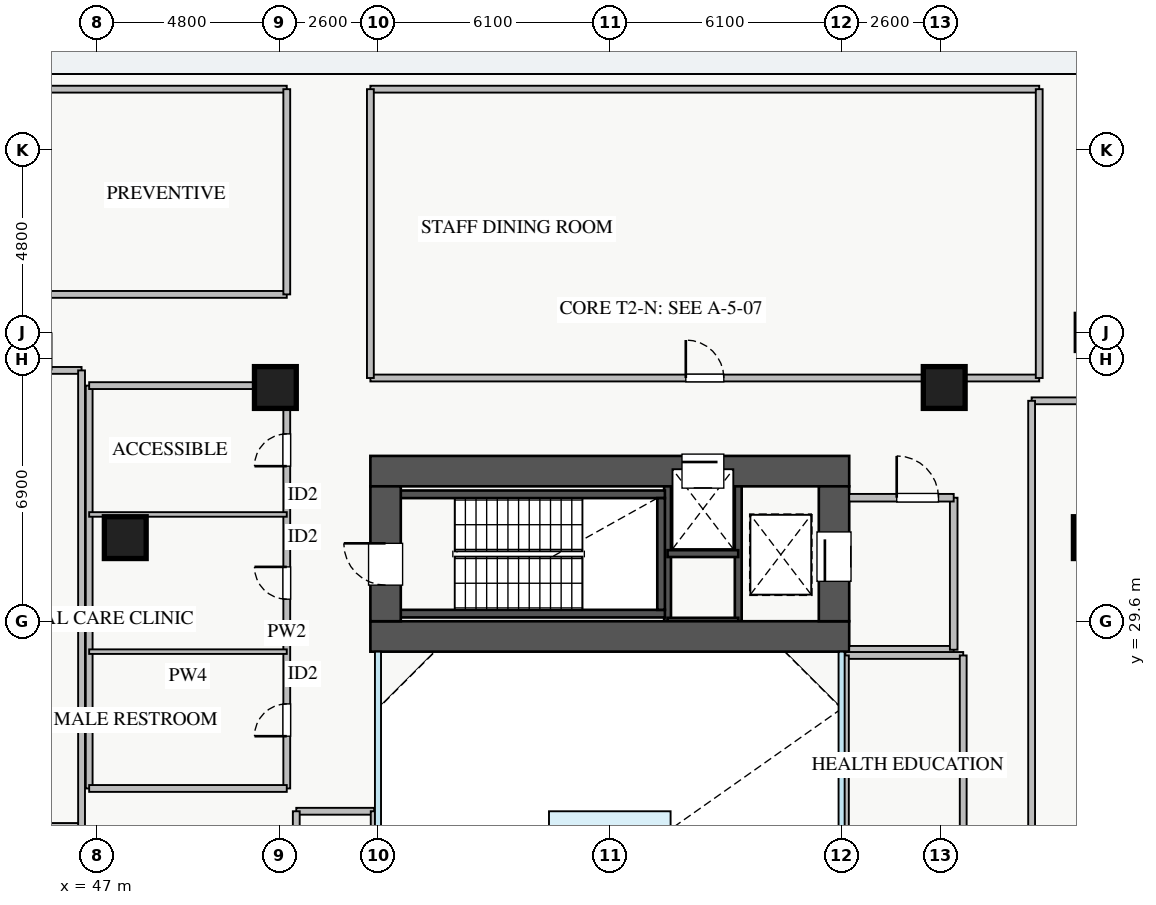
"""IFC4 building model, lengths in metres.
Left out: names, types, materials, properties, quantities, classifications, styles, units other than length and angle.
Written with IfcOpenShell. Run it as: python <this file> out.ifc"""

import sys

from ifc_helpers import new_model, si_unit, direction, frame, frame_2d, origin, origin_2d, place, context, subcontext, project, spatial, rectangle, extrude, source, transform, mapped, element, fill, save


model = new_model("IFC4")
c1 = context("Model", 3, precision=1e-05, world=origin(), true_north=direction((0.0, 1.0)))
c2 = subcontext(c1, "Body", "Model", "MODEL_VIEW")
j1 = project(units=[si_unit("LENGTHUNIT", "METRE"), si_unit("PLANEANGLEUNIT", "RADIAN")], contexts=[c1])
p1 = place(None, origin())
s1 = spatial("IfcSite", under=j1, at=p1, CompositionType="ELEMENT")
p2 = place(p1, origin())
s2 = spatial("IfcBuilding", under=s1, at=p2, CompositionType="ELEMENT")
p3 = place(p2, frame((0.0, 0.0, 5.0)))
s3 = spatial("IfcBuildingStorey", under=s2, at=p3, CompositionType="ELEMENT", Elevation=5.0)
for number, where, z_axis, x_axis in (
    (1, (62.02, 29.6, 0.0), (0.0, 0.0, 1.0), (0.0, 1.0, 0.0)),
    (2, (63.88, 29.6, 0.0), (0.0, 0.0, 1.0), (0.0, 1.0, 0.0)),
):
    element("IfcWall", number, at=place(p3, frame(where, z_axis=z_axis, x_axis=x_axis)), inside=s3, PredefinedType="SHEAR", context=c2, shape_type="SweptSolid", body=[
        extrude(rectangle(XDim=3.95, YDim=0.18, at=frame_2d((1.975, 0.0))), origin(), (0.0, 0.0, 1.0), 4.18),
    ])
for number, where, z_axis, x_axis in (
    (3, (62.02, 31.38, 0.0), (0.0, 0.0, 1.0), (1.0, 0.0, 0.0)),
    (4, (62.02, 29.6, 0.0), (0.0, 0.0, 1.0), (1.0, 0.0, 0.0)),
):
    element("IfcWall", number, at=place(p3, frame(where, z_axis=z_axis, x_axis=x_axis)), inside=s3, PredefinedType="SHEAR", context=c2, shape_type="SweptSolid", body=[
        extrude(rectangle(XDim=1.86, YDim=0.18, at=frame_2d((0.93, 0.0))), origin(), (0.0, 0.0, 1.0), 4.18),
    ])
for number, where, z_axis, x_axis in (
    (5, (54.8, 29.8, 0.0), (0.0, 0.0, 1.0), (1.0, 0.0, 0.0)),
    (6, (54.8, 32.94, 0.0), (0.0, 0.0, 1.0), (1.0, 0.0, 0.0)),
):
    element("IfcWall", number, at=place(p3, frame(where, z_axis=z_axis, x_axis=x_axis)), inside=s3, PredefinedType="SHEAR", context=c2, shape_type="SweptSolid", body=[
        extrude(rectangle(XDim=7.15, YDim=0.2, at=frame_2d((3.575, 0.0))), origin(), (0.0, 0.0, 1.0), 4.4),
    ])
p4 = place(p3, frame((61.85, 29.9, 0.0), z_axis=(0.0, 0.0, 1.0), x_axis=(0.0, 1.0, 0.0)))
e7 = element("IfcWall", 7, at=p4, inside=s3, PredefinedType="SHEAR", context=c2, shape_type="SweptSolid", body=[
    extrude(rectangle(XDim=2.94, YDim=0.2, at=frame_2d((1.47, 0.0))), origin(), (0.0, 0.0, 1.0), 4.4),
])
p5 = place(p3, frame((54.2, 29.2, 0.0), z_axis=(0.0, 0.0, 1.0), x_axis=(1.0, 0.0, 0.0)))
e8 = element("IfcWall", 8, at=p5, inside=s3, PredefinedType="SHEAR", context=c2, shape_type="SweptSolid", body=[
    extrude(rectangle(XDim=12.6, YDim=0.8, at=frame_2d((6.3, 0.0))), origin(), (0.0, 0.0, 1.0), 4.4),
])
p6 = place(p3, frame((54.2, 33.55, 0.0), z_axis=(0.0, 0.0, 1.0), x_axis=(1.0, 0.0, 0.0)))
e9 = element("IfcWall", 9, at=p6, inside=s3, PredefinedType="SHEAR", context=c2, shape_type="SweptSolid", body=[
    extrude(rectangle(XDim=12.6, YDim=0.8, at=frame_2d((6.3, 0.0))), origin(), (0.0, 0.0, 1.0), 4.4),
])
p7 = place(p6, frame((8.2, 0.0, 0.0)))
e10 = element("IfcOpeningElement", 10, at=p7, cuts=e9, PredefinedType="OPENING", context=c2, shape_type="SweptSolid", body=[
    extrude(rectangle(XDim=1.1, YDim=2.05, at=frame_2d((0.55, 1.025))), frame((0.0, 0.41, 0.0), z_axis=(0.0, -1.0, 0.0), x_axis=(1.0, 0.0, 0.0)), (0.0, 0.0, 1.0), 0.82),
])
p8 = place(p3, frame((54.6, 29.6, 0.0), z_axis=(0.0, 0.0, 1.0), x_axis=(0.0, 1.0, 0.0)))
e11 = element("IfcWall", 11, at=p8, inside=s3, PredefinedType="SHEAR", context=c2, shape_type="SweptSolid", body=[
    extrude(rectangle(XDim=3.55, YDim=0.8, at=frame_2d((1.775, 0.0))), origin(), (0.0, 0.0, 1.0), 4.4),
])
p9 = place(p8, frame((0.95, 0.0, 0.0)))
e12 = element("IfcOpeningElement", 12, at=p9, cuts=e11, PredefinedType="OPENING", context=c2, shape_type="SweptSolid", body=[
    extrude(rectangle(XDim=1.1, YDim=2.05, at=frame_2d((0.55, 1.025))), frame((0.0, 0.41, 0.0), z_axis=(0.0, -1.0, 0.0), x_axis=(1.0, 0.0, 0.0)), (0.0, 0.0, 1.0), 0.82),
])
p10 = place(p3, frame((66.4, 29.6, 0.0), z_axis=(0.0, 0.0, 1.0), x_axis=(0.0, 1.0, 0.0)))
e13 = element("IfcWall", 13, at=p10, inside=s3, PredefinedType="SHEAR", context=c2, shape_type="SweptSolid", body=[
    extrude(rectangle(XDim=3.55, YDim=0.8, at=frame_2d((1.775, 0.0))), origin(), (0.0, 0.0, 1.0), 4.4),
])
p11 = place(p10, frame((1.05, 0.0, 0.0)))
e14 = element("IfcOpeningElement", 14, at=p11, cuts=e13, PredefinedType="OPENING", context=c2, shape_type="SweptSolid", body=[
    extrude(rectangle(XDim=1.3, YDim=2.05, at=frame_2d((0.65, 1.025))), frame((0.0, 0.41, 0.0), z_axis=(0.0, -1.0, 0.0), x_axis=(1.0, 0.0, 0.0)), (0.0, 0.0, 1.0), 0.82),
])
m1 = source(origin(), c2, "Body", "SweptSolid", [
    extrude(rectangle(XDim=1.1, YDim=1.1, at=origin_2d()), origin(), (0.0, 0.0, 1.0), 4.4),
])
for number, where, z_axis, x_axis in (
    (15, (73.25, 31.8, 0.0), (0.0, 0.0, 1.0), (1.0, 0.0, 0.0)),
    (16, (69.3, 35.75, 0.0), (0.0, 0.0, 1.0), (1.0, 0.0, 0.0)),
    (17, (51.7, 35.75, 0.0), (0.0, 0.0, 1.0), (1.0, 0.0, 0.0)),
    (18, (47.75, 31.8, 0.0), (0.0, 0.0, 1.0), (1.0, 0.0, 0.0)),
):
    element("IfcColumn", number, at=place(p3, frame(where, z_axis=z_axis, x_axis=x_axis)), inside=s3, PredefinedType="COLUMN", context=c2, shape_type="MappedRepresentation", body=[
        mapped(m1, transform((0.0, 0.0, 0.0), x_axis=(1.0, 0.0, 0.0), y_axis=(0.0, 1.0, 0.0), z_axis=(0.0, 0.0, 1.0), scale=1.0)),
    ])
p12 = place(p3, frame((66.8, 28.85, 0.0), z_axis=(0.0, 0.0, 1.0), x_axis=(1.0, 0.0, 0.0)))
e19 = element("IfcWall", 19, at=p12, inside=s3, PredefinedType="PARTITIONING", context=c2, shape_type="SweptSolid", body=[
    extrude(rectangle(XDim=2.75, YDim=0.2, at=frame_2d((1.375, 0.0))), origin(), (0.0, 0.0, 1.0), 4.18),
])
p13 = place(p3, frame((69.55, 28.85, 0.0), z_axis=(0.0, 0.0, 1.0), x_axis=(0.0, 1.0, 0.0)))
e20 = element("IfcWall", 20, at=p13, inside=s3, PredefinedType="PARTITIONING", context=c2, shape_type="SweptSolid", body=[
    extrude(rectangle(XDim=4.0, YDim=0.2, at=frame_2d((2.0, 0.0))), origin(), (0.0, 0.0, 1.0), 4.18),
])
p14 = place(p3, frame((66.8, 32.85, 0.0), z_axis=(0.0, 0.0, 1.0), x_axis=(1.0, 0.0, 0.0)))
e21 = element("IfcWall", 21, at=p14, inside=s3, PredefinedType="PARTITIONING", context=c2, shape_type="SweptSolid", body=[
    extrude(rectangle(XDim=2.75, YDim=0.2, at=frame_2d((1.375, 0.0))), origin(), (0.0, 0.0, 1.0), 4.18),
])
p15 = place(p14, frame((1.25, 0.0, 0.0)))
e22 = element("IfcOpeningElement", 22, at=p15, cuts=e21, PredefinedType="OPENING", context=c2, shape_type="SweptSolid", body=[
    extrude(rectangle(XDim=1.1, YDim=2.05, at=frame_2d((0.55, 1.025))), frame((0.0, 0.11, 0.0), z_axis=(0.0, -1.0, 0.0), x_axis=(1.0, 0.0, 0.0)), (0.0, 0.0, 1.0), 0.22),
])
p16 = place(p3, frame((52.0, 25.2, 0.0), z_axis=(0.0, 0.0, 1.0), x_axis=(0.0, 1.0, 0.0)))
e23 = element("IfcWall", 23, at=p16, inside=s3, PredefinedType="PARTITIONING", context=c2, shape_type="SweptSolid", body=[
    extrude(rectangle(XDim=10.6, YDim=0.18, at=frame_2d((5.3, 0.0))), origin(), (0.0, 0.0, 1.0), 4.18),
])
p17 = place(p16, frame((1.375, 0.0, 0.0)))
e24 = element("IfcOpeningElement", 24, at=p17, cuts=e23, PredefinedType="OPENING", context=c2, shape_type="SweptSolid", body=[
    extrude(rectangle(XDim=0.85, YDim=2.05, at=frame_2d((0.425, 1.025))), frame((0.0, 0.1, 0.0), z_axis=(0.0, -1.0, 0.0), x_axis=(1.0, 0.0, 0.0)), (0.0, 0.0, 1.0), 0.2),
])
p18 = place(p16, frame((4.98, 0.0, 0.0)))
e25 = element("IfcOpeningElement", 25, at=p18, cuts=e23, PredefinedType="OPENING", context=c2, shape_type="SweptSolid", body=[
    extrude(rectangle(XDim=0.85, YDim=2.05, at=frame_2d((0.425, 1.025))), frame((0.0, 0.1, 0.0), z_axis=(0.0, -1.0, 0.0), x_axis=(1.0, 0.0, 0.0)), (0.0, 0.0, 1.0), 0.2),
])
p19 = place(p16, frame((8.48, 0.0, 0.0)))
e26 = element("IfcOpeningElement", 26, at=p19, cuts=e23, PredefinedType="OPENING", context=c2, shape_type="SweptSolid", body=[
    extrude(rectangle(XDim=0.85, YDim=2.05, at=frame_2d((0.425, 1.025))), frame((0.0, 0.1, 0.0), z_axis=(0.0, -1.0, 0.0), x_axis=(1.0, 0.0, 0.0)), (0.0, 0.0, 1.0), 0.2),
])
p20 = place(p3, frame((46.8, 25.2, 0.0), z_axis=(0.0, 0.0, 1.0), x_axis=(0.0, 1.0, 0.0)))
e27 = element("IfcWall", 27, at=p20, inside=s3, PredefinedType="PARTITIONING", context=c2, shape_type="SweptSolid", body=[
    extrude(rectangle(XDim=10.6, YDim=0.18, at=frame_2d((5.3, 0.0))), origin(), (0.0, 0.0, 1.0), 4.18),
])
for number, where, z_axis, x_axis in (
    (28, (46.8, 25.2, 0.0), (0.0, 0.0, 1.0), (1.0, 0.0, 0.0)),
    (29, (46.8, 35.8, 0.0), (0.0, 0.0, 1.0), (1.0, 0.0, 0.0)),
):
    element("IfcWall", number, at=place(p3, frame(where, z_axis=z_axis, x_axis=x_axis)), inside=s3, PredefinedType="PARTITIONING", context=c2, shape_type="SweptSolid", body=[
        extrude(rectangle(XDim=5.2, YDim=0.18, at=frame_2d((2.6, 0.0))), origin(), (0.0, 0.0, 1.0), 4.18),
    ])
for number, where, z_axis, x_axis in (
    (30, (46.8, 28.8, 0.0), (0.0, 0.0, 1.0), (1.0, 0.0, 0.0)),
    (31, (46.8, 32.41, 0.0), (0.0, 0.0, 1.0), (1.0, 0.0, 0.0)),
):
    element("IfcWall", number, at=place(p3, frame(where, z_axis=z_axis, x_axis=x_axis)), inside=s3, PredefinedType="PLUMBINGWALL", context=c2, shape_type="SweptSolid", body=[
        extrude(rectangle(XDim=5.2, YDim=0.12, at=frame_2d((2.6, 0.0))), origin(), (0.0, 0.0, 1.0), 4.18),
    ])
p21 = place(p3, frame((44.0, 24.2, 0.0), z_axis=(0.0, 0.0, 1.0), x_axis=(1.0, 0.0, 0.0)))
e32 = element("IfcWall", 32, at=p21, inside=s3, PredefinedType="PARTITIONING", context=c2, shape_type="SweptSolid", body=[
    extrude(rectangle(XDim=2.6, YDim=0.18, at=frame_2d((1.3, 0.0))), origin(), (0.0, 0.0, 1.0), 4.18),
])
p22 = place(p3, frame((44.0, 36.2, 0.0), z_axis=(0.0, 0.0, 1.0), x_axis=(1.0, 0.0, 0.0)))
e33 = element("IfcWall", 33, at=p22, inside=s3, PredefinedType="PARTITIONING", context=c2, shape_type="SweptSolid", body=[
    extrude(rectangle(XDim=2.6, YDim=0.18, at=frame_2d((1.3, 0.0))), origin(), (0.0, 0.0, 1.0), 4.18),
])
p23 = place(p22, frame((0.8, 0.0, 0.0)))
e34 = element("IfcOpeningElement", 34, at=p23, cuts=e33, PredefinedType="OPENING", context=c2, shape_type="SweptSolid", body=[
    extrude(rectangle(XDim=1.0, YDim=2.05, at=frame_2d((0.5, 1.025))), frame((0.0, 0.1, 0.0), z_axis=(0.0, -1.0, 0.0), x_axis=(1.0, 0.0, 0.0)), (0.0, 0.0, 1.0), 0.2),
])
p24 = place(p3, frame((46.6, 24.2, 0.0), z_axis=(0.0, 0.0, 1.0), x_axis=(0.0, 1.0, 0.0)))
e35 = element("IfcWall", 35, at=p24, inside=s3, PredefinedType="PARTITIONING", context=c2, shape_type="SweptSolid", body=[
    extrude(rectangle(XDim=12.0, YDim=0.18, at=frame_2d((6.0, 0.0))), origin(), (0.0, 0.0, 1.0), 4.18),
])
p25 = place(p3, frame((52.25, 24.6, 0.0), z_axis=(0.0, 0.0, 1.0), x_axis=(1.0, 0.0, 0.0)))
e36 = element("IfcWall", 36, at=p25, inside=s3, PredefinedType="PARTITIONING", context=c2, shape_type="SweptSolid", body=[
    extrude(rectangle(XDim=2.05, YDim=0.18, at=frame_2d((1.025, 0.0))), origin(), (0.0, 0.0, 1.0), 4.18),
])
p26 = place(p3, frame((52.25, 17.4, 0.0), z_axis=(0.0, 0.0, 1.0), x_axis=(0.0, 1.0, 0.0)))
e37 = element("IfcWall", 37, at=p26, inside=s3, PredefinedType="PARTITIONING", context=c2, shape_type="SweptSolid", body=[
    extrude(rectangle(XDim=7.2, YDim=0.18, at=frame_2d((3.6, 0.0))), origin(), (0.0, 0.0, 1.0), 4.18),
])
p27 = place(p26, frame((3.1, 0.0, 0.0)))
e38 = element("IfcOpeningElement", 38, at=p27, cuts=e37, PredefinedType="OPENING", context=c2, shape_type="SweptSolid", body=[
    extrude(rectangle(XDim=1.0, YDim=2.05, at=frame_2d((0.5, 1.025))), frame((0.0, 0.1, 0.0), z_axis=(0.0, -1.0, 0.0), x_axis=(1.0, 0.0, 0.0)), (0.0, 0.0, 1.0), 0.2),
])
p28 = place(p3, frame((54.3, 17.4, 0.0), z_axis=(0.0, 0.0, 1.0), x_axis=(0.0, 1.0, 0.0)))
e39 = element("IfcWall", 39, at=p28, inside=s3, PredefinedType="PARTITIONING", context=c2, shape_type="SweptSolid", body=[
    extrude(rectangle(XDim=7.2, YDim=0.18, at=frame_2d((3.6, 0.0))), origin(), (0.0, 0.0, 1.0), 4.18),
])
p29 = place(p3, frame((66.7, 28.7, 0.0), z_axis=(0.0, 0.0, 1.0), x_axis=(1.0, 0.0, 0.0)))
e40 = element("IfcWall", 40, at=p29, inside=s3, PredefinedType="PARTITIONING", context=c2, shape_type="SweptSolid", body=[
    extrude(rectangle(XDim=3.1, YDim=0.18, at=frame_2d((1.55, 0.0))), origin(), (0.0, 0.0, 1.0), 4.18),
])
p30 = place(p3, frame((66.7, 17.3, 0.0), z_axis=(0.0, 0.0, 1.0), x_axis=(0.0, 1.0, 0.0)))
e41 = element("IfcWall", 41, at=p30, inside=s3, PredefinedType="PARTITIONING", context=c2, shape_type="SweptSolid", body=[
    extrude(rectangle(XDim=11.4, YDim=0.18, at=frame_2d((5.7, 0.0))), origin(), (0.0, 0.0, 1.0), 4.18),
])
p31 = place(p3, frame((69.8, 17.3, 0.0), z_axis=(0.0, 0.0, 1.0), x_axis=(0.0, 1.0, 0.0)))
e42 = element("IfcWall", 42, at=p31, inside=s3, PredefinedType="PARTITIONING", context=c2, shape_type="SweptSolid", body=[
    extrude(rectangle(XDim=11.4, YDim=0.18, at=frame_2d((5.7, 0.0))), origin(), (0.0, 0.0, 1.0), 4.18),
])
p32 = place(p31, frame((5.2, 0.0, 0.0)))
e43 = element("IfcOpeningElement", 43, at=p32, cuts=e42, PredefinedType="OPENING", context=c2, shape_type="SweptSolid", body=[
    extrude(rectangle(XDim=1.0, YDim=2.05, at=frame_2d((0.5, 1.025))), frame((0.0, 0.1, 0.0), z_axis=(0.0, -1.0, 0.0), x_axis=(1.0, 0.0, 0.0)), (0.0, 0.0, 1.0), 0.2),
])
p33 = place(p3, frame((71.6, 35.4, 0.0), z_axis=(0.0, 0.0, 1.0), x_axis=(1.0, 0.0, 0.0)))
e44 = element("IfcWall", 44, at=p33, inside=s3, PredefinedType="PARTITIONING", context=c2, shape_type="SweptSolid", body=[
    extrude(rectangle(XDim=2.15, YDim=0.18, at=frame_2d((1.075, 0.0))), origin(), (0.0, 0.0, 1.0), 4.18),
])
p34 = place(p3, frame((71.6, 10.6, 0.0), z_axis=(0.0, 0.0, 1.0), x_axis=(0.0, 1.0, 0.0)))
e45 = element("IfcWall", 45, at=p34, inside=s3, PredefinedType="PARTITIONING", context=c2, shape_type="SweptSolid", body=[
    extrude(rectangle(XDim=24.8, YDim=0.18, at=frame_2d((12.4, 0.0))), origin(), (0.0, 0.0, 1.0), 4.18),
])
p35 = place(p34, frame((11.9, 0.0, 0.0)))
e46 = element("IfcOpeningElement", 46, at=p35, cuts=e45, PredefinedType="OPENING", context=c2, shape_type="SweptSolid", body=[
    extrude(rectangle(XDim=1.0, YDim=2.05, at=frame_2d((0.5, 1.025))), frame((0.0, 0.1, 0.0), z_axis=(0.0, -1.0, 0.0), x_axis=(1.0, 0.0, 0.0)), (0.0, 0.0, 1.0), 0.2),
])
p36 = place(p3, frame((32.3, 38.2, 0.0), z_axis=(0.0, 0.0, 1.0), x_axis=(1.0, 0.0, 0.0)))
e47 = element("IfcWall", 47, at=p36, inside=s3, PredefinedType="PARTITIONING", context=c2, shape_type="SweptSolid", body=[
    extrude(rectangle(XDim=19.7, YDim=0.18, at=frame_2d((9.85, 0.0))), origin(), (0.0, 0.0, 1.0), 4.18),
])
p37 = place(p36, frame((9.35, 0.0, 0.0)))
e48 = element("IfcOpeningElement", 48, at=p37, cuts=e47, PredefinedType="OPENING", context=c2, shape_type="SweptSolid", body=[
    extrude(rectangle(XDim=1.0, YDim=2.05, at=frame_2d((0.5, 1.025))), frame((0.0, 0.1, 0.0), z_axis=(0.0, -1.0, 0.0), x_axis=(1.0, 0.0, 0.0)), (0.0, 0.0, 1.0), 0.2),
])
p38 = place(p3, frame((32.3, 43.6, 0.0), z_axis=(0.0, 0.0, 1.0), x_axis=(1.0, 0.0, 0.0)))
e49 = element("IfcWall", 49, at=p38, inside=s3, PredefinedType="PARTITIONING", context=c2, shape_type="SweptSolid", body=[
    extrude(rectangle(XDim=19.7, YDim=0.18, at=frame_2d((9.85, 0.0))), origin(), (0.0, 0.0, 1.0), 4.18),
])
p39 = place(p3, frame((52.0, 38.2, 0.0), z_axis=(0.0, 0.0, 1.0), x_axis=(0.0, 1.0, 0.0)))
e50 = element("IfcWall", 50, at=p39, inside=s3, PredefinedType="PARTITIONING", context=c2, shape_type="SweptSolid", body=[
    extrude(rectangle(XDim=5.4, YDim=0.18, at=frame_2d((2.7, 0.0))), origin(), (0.0, 0.0, 1.0), 4.18),
])
p40 = place(p3, frame((54.2, 36.0, 0.0), z_axis=(0.0, 0.0, 1.0), x_axis=(1.0, 0.0, 0.0)))
e51 = element("IfcWall", 51, at=p40, inside=s3, PredefinedType="PARTITIONING", context=c2, shape_type="SweptSolid", body=[
    extrude(rectangle(XDim=17.6, YDim=0.18, at=frame_2d((8.8, 0.0))), origin(), (0.0, 0.0, 1.0), 3.675),
])
p41 = place(p40, frame((8.3, 0.0, 0.0)))
e52 = element("IfcOpeningElement", 52, at=p41, cuts=e51, PredefinedType="OPENING", context=c2, shape_type="SweptSolid", body=[
    extrude(rectangle(XDim=1.0, YDim=2.05, at=frame_2d((0.5, 1.025))), frame((0.0, 0.1, 0.0), z_axis=(0.0, -1.0, 0.0), x_axis=(1.0, 0.0, 0.0)), (0.0, 0.0, 1.0), 0.2),
])
p42 = place(p3, frame((54.2, 43.6, 0.0), z_axis=(0.0, 0.0, 1.0), x_axis=(1.0, 0.0, 0.0)))
e53 = element("IfcWall", 53, at=p42, inside=s3, PredefinedType="PARTITIONING", context=c2, shape_type="SweptSolid", body=[
    extrude(rectangle(XDim=17.6, YDim=0.18, at=frame_2d((8.8, 0.0))), origin(), (0.0, 0.0, 1.0), 4.18),
])
for number, where, z_axis, x_axis in (
    (54, (54.2, 36.0, 0.0), (0.0, 0.0, 1.0), (0.0, 1.0, 0.0)),
    (55, (71.8, 36.0, 0.0), (0.0, 0.0, 1.0), (0.0, 1.0, 0.0)),
):
    element("IfcWall", number, at=place(p3, frame(where, z_axis=z_axis, x_axis=x_axis)), inside=s3, PredefinedType="PARTITIONING", context=c2, shape_type="SweptSolid", body=[
        extrude(rectangle(XDim=7.6, YDim=0.18, at=frame_2d((3.8, 0.0))), origin(), (0.0, 0.0, 1.0), 4.18),
    ])
p43 = place(p3, frame((0.0, 0.0, -0.22)))
p44 = place(p43, frame((60.5, 23.0, 0.0)))
p45 = place(p44, frame((0.0, 0.0, 0.17)))
e56 = element("IfcWindow", 56, at=p45, inside=s3, PartitioningType="SINGLE_PANEL", PredefinedType="SKYLIGHT", context=c2, shape_type="SweptSolid", body=[
    extrude(rectangle(XDim=3.2, YDim=3.2, at=origin_2d()), origin(), (0.0, 0.0, 1.0), 0.05),
])
m2 = source(origin(), c2, "Body", "SweptSolid", [
    extrude(rectangle(XDim=1.3, YDim=2.05, at=frame_2d((0.65, 1.025))), frame((0.0, 0.025, 0.0), z_axis=(0.0, -1.0, 0.0), x_axis=(1.0, 0.0, 0.0)), (0.0, 0.0, 1.0), 0.05),
])
p46 = place(p11, origin())
e57 = element("IfcDoor", 57, at=p46, inside=s3, OperationType="SLIDING_TO_LEFT", PredefinedType="DOOR", context=c2, shape_type="MappedRepresentation", body=[
    mapped(m2, transform((0.0, 0.0, 0.0), x_axis=(1.0, 0.0, 0.0), y_axis=(0.0, 1.0, 0.0), z_axis=(0.0, 0.0, 1.0), scale=1.0)),
])
fill(e14, e57)
m3 = source(origin(), c2, "Body", "SweptSolid", [
    extrude(rectangle(XDim=1.1, YDim=2.05, at=frame_2d((0.55, 1.025))), frame((0.0, 0.025, 0.0), z_axis=(0.0, -1.0, 0.0), x_axis=(1.0, 0.0, 0.0)), (0.0, 0.0, 1.0), 0.05),
])
p47 = place(p9, origin())
e58 = element("IfcDoor", 58, at=p47, inside=s3, OperationType="SINGLE_SWING_RIGHT", PredefinedType="DOOR", context=c2, shape_type="MappedRepresentation", body=[
    mapped(m3, transform((0.0, 0.0, 0.0), x_axis=(1.0, 0.0, 0.0), y_axis=(0.0, 1.0, 0.0), z_axis=(0.0, 0.0, 1.0), scale=1.0)),
])
fill(e12, e58)
p48 = place(p7, origin())
e59 = element("IfcDoor", 59, at=p48, inside=s3, OperationType="SLIDING_TO_LEFT", PredefinedType="DOOR", context=c2, shape_type="MappedRepresentation", body=[
    mapped(m3, transform((0.0, 0.0, 0.0), x_axis=(1.0, 0.0, 0.0), y_axis=(0.0, 1.0, 0.0), z_axis=(0.0, 0.0, 1.0), scale=1.0)),
])
fill(e10, e59)
p49 = place(p15, origin())
e60 = element("IfcDoor", 60, at=p49, inside=s3, OperationType="SINGLE_SWING_LEFT", PredefinedType="DOOR", context=c2, shape_type="MappedRepresentation", body=[
    mapped(m3, transform((0.0, 0.0, 0.0), x_axis=(1.0, 0.0, 0.0), y_axis=(0.0, 1.0, 0.0), z_axis=(0.0, 0.0, 1.0), scale=1.0)),
])
fill(e22, e60)
m4 = source(origin(), c2, "Body", "SweptSolid", [
    extrude(rectangle(XDim=0.85, YDim=2.05, at=frame_2d((0.425, 1.025))), frame((0.0, 0.025, 0.0), z_axis=(0.0, -1.0, 0.0), x_axis=(1.0, 0.0, 0.0)), (0.0, 0.0, 1.0), 0.05),
])
p50 = place(p17, origin())
e61 = element("IfcDoor", 61, at=p50, inside=s3, OperationType="SINGLE_SWING_LEFT", PredefinedType="DOOR", context=c2, shape_type="MappedRepresentation", body=[
    mapped(m4, transform((0.0, 0.0, 0.0), x_axis=(1.0, 0.0, 0.0), y_axis=(0.0, 1.0, 0.0), z_axis=(0.0, 0.0, 1.0), scale=1.0)),
])
fill(e24, e61)
p51 = place(p18, origin())
e62 = element("IfcDoor", 62, at=p51, inside=s3, OperationType="SINGLE_SWING_RIGHT", PredefinedType="DOOR", context=c2, shape_type="MappedRepresentation", body=[
    mapped(m4, transform((0.0, 0.0, 0.0), x_axis=(1.0, 0.0, 0.0), y_axis=(0.0, 1.0, 0.0), z_axis=(0.0, 0.0, 1.0), scale=1.0)),
])
fill(e25, e62)
p52 = place(p19, origin())
e63 = element("IfcDoor", 63, at=p52, inside=s3, OperationType="SINGLE_SWING_LEFT", PredefinedType="DOOR", context=c2, shape_type="MappedRepresentation", body=[
    mapped(m4, transform((0.0, 0.0, 0.0), x_axis=(1.0, 0.0, 0.0), y_axis=(0.0, 1.0, 0.0), z_axis=(0.0, 0.0, 1.0), scale=1.0)),
])
fill(e26, e63)
m5 = source(origin(), c2, "Body", "SweptSolid", [
    extrude(rectangle(XDim=1.0, YDim=2.05, at=frame_2d((0.5, 1.025))), frame((0.0, 0.025, 0.0), z_axis=(0.0, -1.0, 0.0), x_axis=(1.0, 0.0, 0.0)), (0.0, 0.0, 1.0), 0.05),
])
p53 = place(p41, origin())
e64 = element("IfcDoor", 64, at=p53, inside=s3, OperationType="SINGLE_SWING_LEFT", PredefinedType="DOOR", context=c2, shape_type="MappedRepresentation", body=[
    mapped(m5, transform((0.0, 0.0, 0.0), x_axis=(1.0, 0.0, 0.0), y_axis=(0.0, 1.0, 0.0), z_axis=(0.0, 0.0, 1.0), scale=1.0)),
])
fill(e52, e64)
save(model, sys.argv[1])
